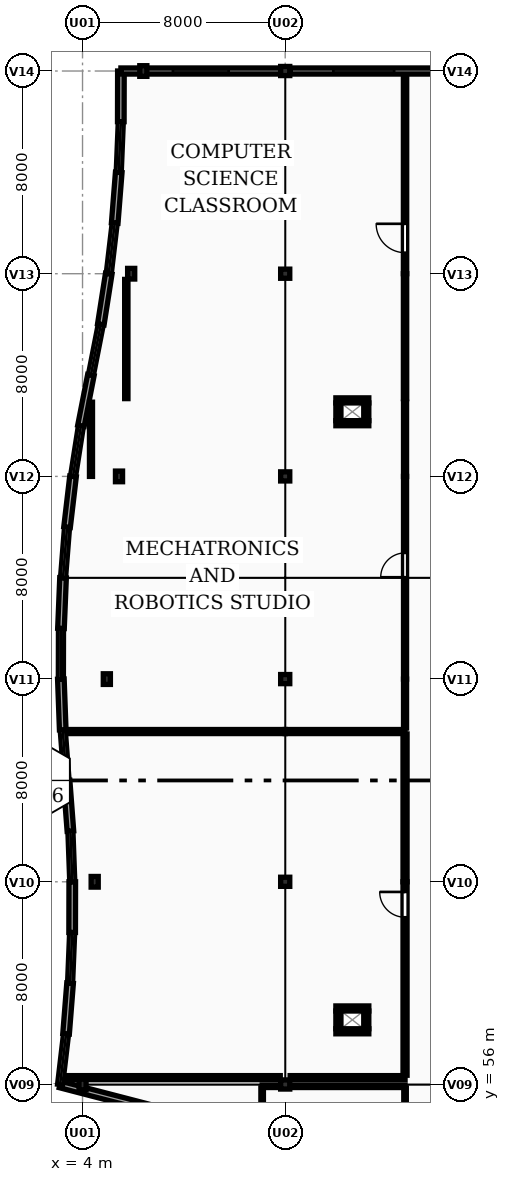
"""IFC4 building model, lengths in metres.
Left out: names, types, materials, properties, quantities, classifications, styles, units other than length and angle.
Written with IfcOpenShell. Run it as: python <this file> out.ifc"""

import sys

from ifc_helpers import new_model, si_unit, direction, frame, frame_2d, origin, origin_2d, place, context, subcontext, project, spatial, rectangle, extrude, element, fill, save


model = new_model("IFC4")
c1 = context("Model", 3, precision=1e-05, world=origin(), true_north=direction((0.0, 1.0)))
c2 = subcontext(c1, "Body", "Model", "MODEL_VIEW")
j1 = project(units=[si_unit("LENGTHUNIT", "METRE"), si_unit("PLANEANGLEUNIT", "RADIAN")], contexts=[c1])
p1 = place(None, origin())
s1 = spatial("IfcSite", under=j1, at=p1, CompositionType="ELEMENT")
p2 = place(p1, origin())
s2 = spatial("IfcBuilding", under=s1, at=p2, CompositionType="ELEMENT")
p3 = place(p2, frame((0.0, 0.0, 8.4)))
s3 = spatial("IfcBuildingStorey", under=s2, at=p3, CompositionType="ELEMENT", Elevation=8.4)
for number, where, z_axis, x_axis in (
    (1, (4.0, 56.0, 0.0), (0.0, 0.0, 1.0), (1.0, 0.0, 0.0)),
    (2, (4.48, 64.0, 0.0), (0.0, 0.0, 1.0), (1.0, 0.0, 0.0)),
    (3, (4.96, 72.0, 0.0), (0.0, 0.0, 1.0), (1.0, 0.0, 0.0)),
    (4, (5.44, 80.0, 0.0), (0.0, 0.0, 1.0), (1.0, 0.0, 0.0)),
    (5, (5.92, 88.0, 0.0), (0.0, 0.0, 1.0), (1.0, 0.0, 0.0)),
    (6, (6.4, 96.0, 0.0), (0.0, 0.0, 1.0), (1.0, 0.0, 0.0)),
):
    element("IfcColumn", number, at=place(p3, frame(where, z_axis=z_axis, x_axis=x_axis)), inside=s3, PredefinedType="PILASTER", context=c2, shape_type="SweptSolid", body=[
        extrude(rectangle(XDim=0.28, YDim=0.42, at=origin_2d()), origin(), (0.0, 0.0, 1.0), 3.9),
    ])
for number, where, z_axis, x_axis in (
    (7, (12.0, 56.0, 0.0), (0.0, 0.0, 1.0), (1.0, 0.0, 0.0)),
    (8, (12.0, 64.0, 0.0), (0.0, 0.0, 1.0), (1.0, 0.0, 0.0)),
    (9, (12.0, 72.0, 0.0), (0.0, 0.0, 1.0), (1.0, 0.0, 0.0)),
    (10, (12.0, 80.0, 0.0), (0.0, 0.0, 1.0), (1.0, 0.0, 0.0)),
    (11, (12.0, 88.0, 0.0), (0.0, 0.0, 1.0), (1.0, 0.0, 0.0)),
    (12, (12.0, 96.0, 0.0), (0.0, 0.0, 1.0), (1.0, 0.0, 0.0)),
):
    element("IfcColumn", number, at=place(p3, frame(where, z_axis=z_axis, x_axis=x_axis)), inside=s3, PredefinedType="COLUMN", context=c2, shape_type="SweptSolid", body=[
        extrude(rectangle(XDim=0.36, YDim=0.36, at=origin_2d()), origin(), (0.0, 0.0, 1.0), 3.9),
    ])
p4 = place(p3, frame((10.822, 54.0, 0.0), z_axis=(0.0, 0.0, 1.0), x_axis=(-0.967937555254, 0.251190941573, 0.0)))
e13 = element("IfcWall", 13, at=p4, inside=s3, PredefinedType="SOLIDWALL", context=c2, shape_type="SweptSolid", body=[
    extrude(rectangle(XDim=7.962, YDim=0.26, at=frame_2d((3.981, 0.0))), origin(), (0.0, 0.0, 1.0), 3.65),
])
p5 = place(p4, frame((2.981, 0.0, 0.95)))
e14 = element("IfcOpeningElement", 14, at=p5, cuts=e13, PredefinedType="OPENING", context=c2, shape_type="SweptSolid", body=[
    extrude(rectangle(XDim=2.0, YDim=1.5, at=frame_2d((1.0, 0.75))), frame((0.0, 0.14, 0.0), z_axis=(0.0, -1.0, 0.0), x_axis=(1.0, 0.0, 0.0)), (0.0, 0.0, 1.0), 0.28),
])
p6 = place(p3, frame((3.115, 56.0, 0.0), z_axis=(0.0, 0.0, 1.0), x_axis=(0.116988959085, 0.99313321536, 0.0)))
e15 = element("IfcWall", 15, at=p6, inside=s3, PredefinedType="SOLIDWALL", context=c2, shape_type="SweptSolid", body=[
    extrude(rectangle(XDim=2.014, YDim=0.2, at=frame_2d((1.007, 0.0))), origin(), (0.0, 0.0, 1.0), 0.95),
])
p7 = place(p3, frame((3.351, 58.0, 0.0), z_axis=(0.0, 0.0, 1.0), x_axis=(0.078976178075, 0.996876503533, 0.0)))
e16 = element("IfcWall", 16, at=p7, inside=s3, PredefinedType="SOLIDWALL", context=c2, shape_type="SweptSolid", body=[
    extrude(rectangle(XDim=2.006, YDim=0.26, at=frame_2d((1.003, 0.0))), origin(), (0.0, 0.0, 1.0), 3.65),
])
p8 = place(p3, frame((3.509, 60.0, 0.0), z_axis=(0.0, 0.0, 1.0), x_axis=(0.040737639062, 0.99916987783, 0.0)))
e17 = element("IfcWall", 17, at=p8, inside=s3, PredefinedType="SOLIDWALL", context=c2, shape_type="SweptSolid", body=[
    extrude(rectangle(XDim=2.002, YDim=0.2, at=frame_2d((1.001, 0.0))), origin(), (0.0, 0.0, 1.0), 0.95),
])
p9 = place(p3, frame((3.591, 62.0, 0.0), z_axis=(0.0, 0.0, 1.0), x_axis=(0.002197260321, 0.999997586021, 0.0)))
e18 = element("IfcWall", 18, at=p9, inside=s3, PredefinedType="SOLIDWALL", context=c2, shape_type="SweptSolid", body=[
    extrude(rectangle(XDim=2.0, YDim=0.26, at=frame_2d((1.0, 0.0))), origin(), (0.0, 0.0, 1.0), 3.65),
])
p10 = place(p3, frame((3.595, 64.0, 0.0), z_axis=(0.0, 0.0, 1.0), x_axis=(-0.036596562065, 0.999330121454, 0.0)))
e19 = element("IfcWall", 19, at=p10, inside=s3, PredefinedType="SOLIDWALL", context=c2, shape_type="SweptSolid", body=[
    extrude(rectangle(XDim=2.001, YDim=0.2, at=frame_2d((1.0, 0.0))), origin(), (0.0, 0.0, 1.0), 0.95),
])
p11 = place(p3, frame((3.522, 66.0, 0.0), z_axis=(0.0, 0.0, 1.0), x_axis=(-0.075588789742, 0.997139074987, 0.0)))
e20 = element("IfcWall", 20, at=p11, inside=s3, PredefinedType="SOLIDWALL", context=c2, shape_type="SweptSolid", body=[
    extrude(rectangle(XDim=2.006, YDim=0.26, at=frame_2d((1.003, 0.0))), origin(), (0.0, 0.0, 1.0), 3.65),
])
p12 = place(p3, frame((3.37, 68.0, 0.0), z_axis=(0.0, 0.0, 1.0), x_axis=(-0.075709813676, 0.9971298933, 0.0)))
e21 = element("IfcWall", 21, at=p12, inside=s3, PredefinedType="SOLIDWALL", context=c2, shape_type="SweptSolid", body=[
    extrude(rectangle(XDim=2.006, YDim=0.2, at=frame_2d((1.003, 0.0))), origin(), (0.0, 0.0, 1.0), 0.95),
])
p13 = place(p3, frame((3.218, 70.0, 0.0), z_axis=(0.0, 0.0, 1.0), x_axis=(-0.036596562065, 0.999330121454, 0.0)))
e22 = element("IfcWall", 22, at=p13, inside=s3, PredefinedType="SOLIDWALL", context=c2, shape_type="SweptSolid", body=[
    extrude(rectangle(XDim=2.001, YDim=0.26, at=frame_2d((1.0, 0.0))), origin(), (0.0, 0.0, 1.0), 3.65),
])
p14 = place(p3, frame((3.145, 72.0, 0.0), z_axis=(0.0, 0.0, 1.0), x_axis=(0.002197260321, 0.999997586021, 0.0)))
e23 = element("IfcWall", 23, at=p14, inside=s3, PredefinedType="SOLIDWALL", context=c2, shape_type="SweptSolid", body=[
    extrude(rectangle(XDim=2.0, YDim=0.2, at=frame_2d((1.0, 0.0))), origin(), (0.0, 0.0, 1.0), 0.95),
])
p15 = place(p3, frame((3.149, 74.0, 0.0), z_axis=(0.0, 0.0, 1.0), x_axis=(0.040737639062, 0.99916987783, 0.0)))
e24 = element("IfcWall", 24, at=p15, inside=s3, PredefinedType="SOLIDWALL", context=c2, shape_type="SweptSolid", body=[
    extrude(rectangle(XDim=2.002, YDim=0.26, at=frame_2d((1.001, 0.0))), origin(), (0.0, 0.0, 1.0), 3.65),
])
p16 = place(p3, frame((3.231, 76.0, 0.0), z_axis=(0.0, 0.0, 1.0), x_axis=(0.078976178075, 0.996876503533, 0.0)))
e25 = element("IfcWall", 25, at=p16, inside=s3, PredefinedType="SOLIDWALL", context=c2, shape_type="SweptSolid", body=[
    extrude(rectangle(XDim=2.006, YDim=0.2, at=frame_2d((1.003, 0.0))), origin(), (0.0, 0.0, 1.0), 0.95),
])
p17 = place(p3, frame((3.389, 78.0, 0.0), z_axis=(0.0, 0.0, 1.0), x_axis=(0.116988959085, 0.99313321536, 0.0)))
e26 = element("IfcWall", 26, at=p17, inside=s3, PredefinedType="SOLIDWALL", context=c2, shape_type="SweptSolid", body=[
    extrude(rectangle(XDim=2.014, YDim=0.26, at=frame_2d((1.007, 0.0))), origin(), (0.0, 0.0, 1.0), 3.65),
])
p18 = place(p3, frame((3.625, 80.0, 0.0), z_axis=(0.0, 0.0, 1.0), x_axis=(0.15473004848, 0.987956786554, 0.0)))
e27 = element("IfcWall", 27, at=p18, inside=s3, PredefinedType="SOLIDWALL", context=c2, shape_type="SweptSolid", body=[
    extrude(rectangle(XDim=2.024, YDim=0.2, at=frame_2d((1.012, 0.0))), origin(), (0.0, 0.0, 1.0), 0.95),
])
p19 = place(p3, frame((3.938, 82.0, 0.0), z_axis=(0.0, 0.0, 1.0), x_axis=(0.192267434085, 0.981342566992, 0.0)))
e28 = element("IfcWall", 28, at=p19, inside=s3, PredefinedType="SOLIDWALL", context=c2, shape_type="SweptSolid", body=[
    extrude(rectangle(XDim=2.038, YDim=0.26, at=frame_2d((1.019, 0.0))), origin(), (0.0, 0.0, 1.0), 3.65),
])
p20 = place(p3, frame((4.33, 84.0, 0.0), z_axis=(0.0, 0.0, 1.0), x_axis=(0.192152065658, 0.981365163262, 0.0)))
e29 = element("IfcWall", 29, at=p20, inside=s3, PredefinedType="SOLIDWALL", context=c2, shape_type="SweptSolid", body=[
    extrude(rectangle(XDim=2.038, YDim=0.2, at=frame_2d((1.019, 0.0))), origin(), (0.0, 0.0, 1.0), 0.95),
])
p21 = place(p3, frame((4.722, 86.0, 0.0), z_axis=(0.0, 0.0, 1.0), x_axis=(0.15473004848, 0.987956786554, 0.0)))
e30 = element("IfcWall", 30, at=p21, inside=s3, PredefinedType="SOLIDWALL", context=c2, shape_type="SweptSolid", body=[
    extrude(rectangle(XDim=2.024, YDim=0.26, at=frame_2d((1.012, 0.0))), origin(), (0.0, 0.0, 1.0), 3.65),
])
p22 = place(p3, frame((5.035, 88.0, 0.0), z_axis=(0.0, 0.0, 1.0), x_axis=(0.116988959085, 0.99313321536, 0.0)))
e31 = element("IfcWall", 31, at=p22, inside=s3, PredefinedType="SOLIDWALL", context=c2, shape_type="SweptSolid", body=[
    extrude(rectangle(XDim=2.014, YDim=0.2, at=frame_2d((1.007, 0.0))), origin(), (0.0, 0.0, 1.0), 0.95),
])
p23 = place(p3, frame((5.271, 90.0, 0.0), z_axis=(0.0, 0.0, 1.0), x_axis=(0.079097106354, 0.996866915775, 0.0)))
e32 = element("IfcWall", 32, at=p23, inside=s3, PredefinedType="SOLIDWALL", context=c2, shape_type="SweptSolid", body=[
    extrude(rectangle(XDim=2.006, YDim=0.26, at=frame_2d((1.003, 0.0))), origin(), (0.0, 0.0, 1.0), 3.65),
])
p24 = place(p3, frame((5.429, 92.0, 0.0), z_axis=(0.0, 0.0, 1.0), x_axis=(0.04061587159, 0.999174835039, 0.0)))
e33 = element("IfcWall", 33, at=p24, inside=s3, PredefinedType="SOLIDWALL", context=c2, shape_type="SweptSolid", body=[
    extrude(rectangle(XDim=2.002, YDim=0.2, at=frame_2d((1.001, 0.0))), origin(), (0.0, 0.0, 1.0), 0.95),
])
p25 = place(p3, frame((5.51, 94.0, 0.0), z_axis=(0.0, 0.0, 1.0), x_axis=(0.002197260321, 0.999997586021, 0.0)))
e34 = element("IfcWall", 34, at=p25, inside=s3, PredefinedType="SOLIDWALL", context=c2, shape_type="SweptSolid", body=[
    extrude(rectangle(XDim=2.0, YDim=0.26, at=frame_2d((1.0, 0.0))), origin(), (0.0, 0.0, 1.0), 3.65),
])
p26 = place(p3, frame((5.515, 96.0, 0.0), z_axis=(0.0, 0.0, 1.0), x_axis=(1.0, 0.0, 0.0)))
e35 = element("IfcWall", 35, at=p26, inside=s3, PredefinedType="SOLIDWALL", context=c2, shape_type="SweptSolid", body=[
    extrude(rectangle(XDim=6.305, YDim=0.24, at=frame_2d((3.153, 0.0))), origin(), (0.0, 0.0, 1.0), 3.09),
])
p27 = place(p26, frame((2.052, 0.0, 0.95)))
e36 = element("IfcOpeningElement", 36, at=p27, cuts=e35, PredefinedType="OPENING", context=c2, shape_type="SweptSolid", body=[
    extrude(rectangle(XDim=2.2, YDim=1.5, at=frame_2d((1.1, 0.75))), frame((0.0, 0.13, 0.0), z_axis=(0.0, -1.0, 0.0), x_axis=(1.0, 0.0, 0.0)), (0.0, 0.0, 1.0), 0.26),
])
p28 = place(p3, frame((12.18, 96.0, 0.0), z_axis=(0.0, 0.0, 1.0), x_axis=(1.0, 0.0, 0.0)))
e37 = element("IfcWall", 37, at=p28, inside=s3, PredefinedType="SOLIDWALL", context=c2, shape_type="SweptSolid", body=[
    extrude(rectangle(XDim=7.64, YDim=0.24, at=frame_2d((3.82, 0.0))), origin(), (0.0, 0.0, 1.0), 3.09),
])
p29 = place(p28, frame((1.72, 0.0, 0.95)))
e38 = element("IfcOpeningElement", 38, at=p29, cuts=e37, PredefinedType="OPENING", context=c2, shape_type="SweptSolid", body=[
    extrude(rectangle(XDim=2.4, YDim=1.5, at=frame_2d((1.2, 0.75))), frame((0.0, 0.13, 0.0), z_axis=(0.0, -1.0, 0.0), x_axis=(1.0, 0.0, 0.0)), (0.0, 0.0, 1.0), 0.26),
])
for number, where, z_axis, x_axis in (
    (39, (15.3, 58.1, 0.0), (0.0, 0.0, 1.0), (-1.0, 0.0, 0.0)),
    (40, (14.0, 59.0, 0.0), (0.0, 0.0, 1.0), (1.0, 0.0, 0.0)),
):
    element("IfcWall", number, at=place(p3, frame(where, z_axis=z_axis, x_axis=x_axis)), inside=s3, PredefinedType="PARTITIONING", context=c2, shape_type="SweptSolid", body=[
        extrude(rectangle(XDim=1.3, YDim=0.2, at=frame_2d((0.65, 0.0))), origin(), (0.0, 0.0, 1.0), 3.65),
    ])
for number, where, z_axis, x_axis in (
    (41, (14.1, 58.2, 0.0), (0.0, 0.0, 1.0), (0.0, 1.0, 0.0)),
    (42, (15.2, 58.9, 0.0), (0.0, 0.0, 1.0), (0.0, -1.0, 0.0)),
):
    element("IfcWall", number, at=place(p3, frame(where, z_axis=z_axis, x_axis=x_axis)), inside=s3, PredefinedType="PARTITIONING", context=c2, shape_type="SweptSolid", body=[
        extrude(rectangle(XDim=0.7, YDim=0.2, at=frame_2d((0.35, 0.0))), origin(), (0.0, 0.0, 1.0), 3.65),
    ])
for number, where, z_axis, x_axis in (
    (43, (15.3, 82.1, 0.0), (0.0, 0.0, 1.0), (-1.0, 0.0, 0.0)),
    (44, (14.0, 83.0, 0.0), (0.0, 0.0, 1.0), (1.0, 0.0, 0.0)),
):
    element("IfcWall", number, at=place(p3, frame(where, z_axis=z_axis, x_axis=x_axis)), inside=s3, PredefinedType="PARTITIONING", context=c2, shape_type="SweptSolid", body=[
        extrude(rectangle(XDim=1.3, YDim=0.2, at=frame_2d((0.65, 0.0))), origin(), (0.0, 0.0, 1.0), 3.65),
    ])
for number, where, z_axis, x_axis in (
    (45, (14.1, 82.2, 0.0), (0.0, 0.0, 1.0), (0.0, 1.0, 0.0)),
    (46, (15.2, 82.9, 0.0), (0.0, 0.0, 1.0), (0.0, -1.0, 0.0)),
):
    element("IfcWall", number, at=place(p3, frame(where, z_axis=z_axis, x_axis=x_axis)), inside=s3, PredefinedType="PARTITIONING", context=c2, shape_type="SweptSolid", body=[
        extrude(rectangle(XDim=0.7, YDim=0.2, at=frame_2d((0.35, 0.0))), origin(), (0.0, 0.0, 1.0), 3.65),
    ])
p30 = place(p3, frame((3.289, 56.27, 0.0), z_axis=(0.0, 0.0, 1.0), x_axis=(1.0, 0.0, 0.0)))
e47 = element("IfcWall", 47, at=p30, inside=s3, PredefinedType="PARTITIONING", context=c2, shape_type="SweptSolid", body=[
    extrude(rectangle(XDim=8.516, YDim=0.16, at=frame_2d((4.258, 0.0))), origin(), (0.0, 0.0, 1.0), 3.09),
])
p31 = place(p3, frame((12.195, 56.27, 0.0), z_axis=(0.0, 0.0, 1.0), x_axis=(1.0, 0.0, 0.0)))
e48 = element("IfcWall", 48, at=p31, inside=s3, PredefinedType="PARTITIONING", context=c2, shape_type="SweptSolid", body=[
    extrude(rectangle(XDim=4.535, YDim=0.16, at=frame_2d((2.268, 0.0))), origin(), (0.0, 0.0, 1.0), 3.088),
])
p32 = place(p3, frame((3.393, 69.93, 0.0), z_axis=(0.0, 0.0, 1.0), x_axis=(1.0, 0.0, 0.0)))
e49 = element("IfcWall", 49, at=p32, inside=s3, PredefinedType="PARTITIONING", context=c2, shape_type="SweptSolid", body=[
    extrude(rectangle(XDim=8.607, YDim=0.16, at=frame_2d((4.304, 0.0))), origin(), (0.0, 0.0, 1.0), 3.65),
])
p33 = place(p3, frame((12.0, 69.93, 0.0), z_axis=(0.0, 0.0, 1.0), x_axis=(1.0, 0.0, 0.0)))
e50 = element("IfcWall", 50, at=p33, inside=s3, PredefinedType="PARTITIONING", context=c2, shape_type="SweptSolid", body=[
    extrude(rectangle(XDim=4.73, YDim=0.16, at=frame_2d((2.365, 0.0))), origin(), (0.0, 0.0, 1.0), 3.65),
])
p34 = place(p3, frame((16.73, 56.365, 0.0), z_axis=(0.0, 0.0, 1.0), x_axis=(0.0, 1.0, 0.0)))
e51 = element("IfcWall", 51, at=p34, inside=s3, PredefinedType="PARTITIONING", context=c2, shape_type="SweptSolid", body=[
    extrude(rectangle(XDim=7.635, YDim=0.16, at=frame_2d((3.817, 0.0))), origin(), (0.0, 0.0, 1.0), 3.65),
])
p35 = place(p34, frame((6.235, 0.0, 0.0)))
e52 = element("IfcOpeningElement", 52, at=p35, cuts=e51, PredefinedType="OPENING", context=c2, shape_type="SweptSolid", body=[
    extrude(rectangle(XDim=1.0, YDim=2.15, at=frame_2d((0.5, 1.075))), frame((0.0, 0.09, 0.0), z_axis=(0.0, -1.0, 0.0), x_axis=(1.0, 0.0, 0.0)), (0.0, 0.0, 1.0), 0.18),
])
p36 = place(p3, frame((16.73, 64.0, 0.0), z_axis=(0.0, 0.0, 1.0), x_axis=(0.0, 1.0, 0.0)))
e53 = element("IfcWall", 53, at=p36, inside=s3, PredefinedType="PARTITIONING", context=c2, shape_type="SweptSolid", body=[
    extrude(rectangle(XDim=5.835, YDim=0.16, at=frame_2d((2.917, 0.0))), origin(), (0.0, 0.0, 1.0), 3.65),
])
p37 = place(p3, frame((4.334, 80.0, 0.0), z_axis=(0.0, 0.0, 1.0), x_axis=(0.0, 1.0, 0.0)))
e54 = element("IfcWall", 54, at=p37, inside=s3, PredefinedType="PARTITIONING", context=c2, shape_type="SweptSolid", body=[
    extrude(rectangle(XDim=2.93, YDim=0.12, at=frame_2d((1.465, 0.0))), origin(), (0.0, 0.0, 1.0), 3.65),
])
p38 = place(p3, frame((16.73, 70.07, 0.0), z_axis=(0.0, 0.0, 1.0), x_axis=(0.0, 1.0, 0.0)))
e55 = element("IfcWall", 55, at=p38, inside=s3, PredefinedType="PARTITIONING", context=c2, shape_type="SweptSolid", body=[
    extrude(rectangle(XDim=1.93, YDim=0.12, at=frame_2d((0.965, 0.0))), origin(), (0.0, 0.0, 1.0), 3.65),
])
p39 = place(p3, frame((16.73, 72.0, 0.0), z_axis=(0.0, 0.0, 1.0), x_axis=(0.0, 1.0, 0.0)))
e56 = element("IfcWall", 56, at=p39, inside=s3, PredefinedType="PARTITIONING", context=c2, shape_type="SweptSolid", body=[
    extrude(rectangle(XDim=8.0, YDim=0.12, at=frame_2d((4.0, 0.0))), origin(), (0.0, 0.0, 1.0), 3.65),
])
p40 = place(p39, frame((4.02, 0.0, 0.0)))
e57 = element("IfcOpeningElement", 57, at=p40, cuts=e56, PredefinedType="OPENING", context=c2, shape_type="SweptSolid", body=[
    extrude(rectangle(XDim=0.96, YDim=2.15, at=frame_2d((0.48, 1.075))), frame((0.0, 0.07, 0.0), z_axis=(0.0, -1.0, 0.0), x_axis=(1.0, 0.0, 0.0)), (0.0, 0.0, 1.0), 0.14),
])
p41 = place(p3, frame((16.73, 80.0, 0.0), z_axis=(0.0, 0.0, 1.0), x_axis=(0.0, 1.0, 0.0)))
e58 = element("IfcWall", 58, at=p41, inside=s3, PredefinedType="PARTITIONING", context=c2, shape_type="SweptSolid", body=[
    extrude(rectangle(XDim=2.93, YDim=0.12, at=frame_2d((1.465, 0.0))), origin(), (0.0, 0.0, 1.0), 3.65),
])
p42 = place(p3, frame((5.728, 83.07, 0.0), z_axis=(0.0, 0.0, 1.0), x_axis=(0.0, 1.0, 0.0)))
e59 = element("IfcWall", 59, at=p42, inside=s3, PredefinedType="PARTITIONING", context=c2, shape_type="SweptSolid", body=[
    extrude(rectangle(XDim=4.705, YDim=0.13, at=frame_2d((2.353, 0.0))), origin(), (0.0, 0.0, 1.0), 3.29),
])
p43 = place(p3, frame((16.73, 83.07, 0.0), z_axis=(0.0, 0.0, 1.0), x_axis=(0.0, 1.0, 0.0)))
e60 = element("IfcWall", 60, at=p43, inside=s3, PredefinedType="PARTITIONING", context=c2, shape_type="SweptSolid", body=[
    extrude(rectangle(XDim=4.93, YDim=0.13, at=frame_2d((2.465, 0.0))), origin(), (0.0, 0.0, 1.0), 3.65),
])
p44 = place(p3, frame((16.73, 88.0, 0.0), z_axis=(0.0, 0.0, 1.0), x_axis=(0.0, 1.0, 0.0)))
e61 = element("IfcWall", 61, at=p44, inside=s3, PredefinedType="PARTITIONING", context=c2, shape_type="SweptSolid", body=[
    extrude(rectangle(XDim=7.838, YDim=0.13, at=frame_2d((3.919, 0.0))), origin(), (0.0, 0.0, 1.0), 3.65),
])
p45 = place(p44, frame((0.83, 0.0, 0.0)))
e62 = element("IfcOpeningElement", 62, at=p45, cuts=e61, PredefinedType="OPENING", context=c2, shape_type="SweptSolid", body=[
    extrude(rectangle(XDim=1.14, YDim=2.2, at=frame_2d((0.57, 1.1))), frame((0.0, 0.075, 0.0), z_axis=(0.0, -1.0, 0.0), x_axis=(1.0, 0.0, 0.0)), (0.0, 0.0, 1.0), 0.15),
])
p46 = place(p3, frame((11.09, 55.93, 0.0), z_axis=(0.0, 0.0, 1.0), x_axis=(1.0, 0.0, 0.0)))
e63 = element("IfcWall", 63, at=p46, inside=s3, PredefinedType="PARTITIONING", context=c2, shape_type="SweptSolid", body=[
    extrude(rectangle(XDim=5.64, YDim=0.1, at=frame_2d((2.82, 0.0))), origin(), (0.0, 0.0, 1.0), 3.088),
])
p47 = place(p3, frame((11.09, 54.02, 0.0), z_axis=(0.0, 0.0, 1.0), x_axis=(0.0, 1.0, 0.0)))
e64 = element("IfcWall", 64, at=p47, inside=s3, PredefinedType="PARTITIONING", context=c2, shape_type="SweptSolid", body=[
    extrude(rectangle(XDim=1.845, YDim=0.1, at=frame_2d((0.922, 0.0))), origin(), (0.0, 0.0, 1.0), 3.65),
])
p48 = place(p3, frame((16.73, 44.162, 0.0), z_axis=(0.0, 0.0, 1.0), x_axis=(0.0, 1.0, 0.0)))
e65 = element("IfcWall", 65, at=p48, inside=s3, PredefinedType="PARTITIONING", context=c2, shape_type="SweptSolid", body=[
    extrude(rectangle(XDim=11.703, YDim=0.1, at=frame_2d((5.852, 0.0))), origin(), (0.0, 0.0, 1.0), 3.65),
])
p49 = place(p48, frame((8.328, 0.0, 0.0)))
e66 = element("IfcOpeningElement", 66, at=p49, cuts=e65, PredefinedType="OPENING", context=c2, shape_type="SweptSolid", body=[
    extrude(rectangle(XDim=1.02, YDim=2.1, at=frame_2d((0.51, 1.05))), frame((0.0, 0.06, 0.0), z_axis=(0.0, -1.0, 0.0), x_axis=(1.0, 0.0, 0.0)), (0.0, 0.0, 1.0), 0.12),
])
p50 = place(p5, origin())
e67 = element("IfcWindow", 67, at=p50, inside=s3, PartitioningType="DOUBLE_PANEL_VERTICAL", PredefinedType="WINDOW", context=c2, shape_type="SweptSolid", body=[
    extrude(rectangle(XDim=2.0, YDim=1.5, at=frame_2d((1.0, 0.75))), frame((0.0, 0.03, 0.0), z_axis=(0.0, -1.0, 0.0), x_axis=(1.0, 0.0, 0.0)), (0.0, 0.0, 1.0), 0.06),
])
fill(e14, e67)
p51 = place(p27, origin())
e68 = element("IfcWindow", 68, at=p51, inside=s3, PartitioningType="DOUBLE_PANEL_VERTICAL", PredefinedType="WINDOW", context=c2, shape_type="SweptSolid", body=[
    extrude(rectangle(XDim=2.2, YDim=1.5, at=frame_2d((1.1, 0.75))), frame((0.0, 0.03, 0.0), z_axis=(0.0, -1.0, 0.0), x_axis=(1.0, 0.0, 0.0)), (0.0, 0.0, 1.0), 0.06),
])
fill(e36, e68)
p52 = place(p29, origin())
e69 = element("IfcWindow", 69, at=p52, inside=s3, PartitioningType="DOUBLE_PANEL_VERTICAL", PredefinedType="WINDOW", context=c2, shape_type="SweptSolid", body=[
    extrude(rectangle(XDim=2.4, YDim=1.5, at=frame_2d((1.2, 0.75))), frame((0.0, 0.03, 0.0), z_axis=(0.0, -1.0, 0.0), x_axis=(1.0, 0.0, 0.0)), (0.0, 0.0, 1.0), 0.06),
])
fill(e38, e69)
p53 = place(p35, origin())
e70 = element("IfcDoor", 70, at=p53, inside=s3, OperationType="SINGLE_SWING_RIGHT", PredefinedType="DOOR", context=c2, shape_type="SweptSolid", body=[
    extrude(rectangle(XDim=1.0, YDim=2.15, at=frame_2d((0.5, 1.075))), frame((0.0, 0.025, 0.0), z_axis=(0.0, -1.0, 0.0), x_axis=(1.0, 0.0, 0.0)), (0.0, 0.0, 1.0), 0.05),
])
fill(e52, e70)
p54 = place(p40, origin())
e71 = element("IfcDoor", 71, at=p54, inside=s3, OperationType="SINGLE_SWING_LEFT", PredefinedType="DOOR", context=c2, shape_type="SweptSolid", body=[
    extrude(rectangle(XDim=0.96, YDim=2.15, at=frame_2d((0.48, 1.075))), frame((0.0, 0.025, 0.0), z_axis=(0.0, -1.0, 0.0), x_axis=(1.0, 0.0, 0.0)), (0.0, 0.0, 1.0), 0.05),
])
fill(e57, e71)
p55 = place(p45, origin())
e72 = element("IfcDoor", 72, at=p55, inside=s3, OperationType="SINGLE_SWING_RIGHT", PredefinedType="DOOR", context=c2, shape_type="SweptSolid", body=[
    extrude(rectangle(XDim=1.14, YDim=2.2, at=frame_2d((0.57, 1.1))), frame((0.0, 0.025, 0.0), z_axis=(0.0, -1.0, 0.0), x_axis=(1.0, 0.0, 0.0)), (0.0, 0.0, 1.0), 0.05),
])
fill(e62, e72)
save(model, sys.argv[1])
